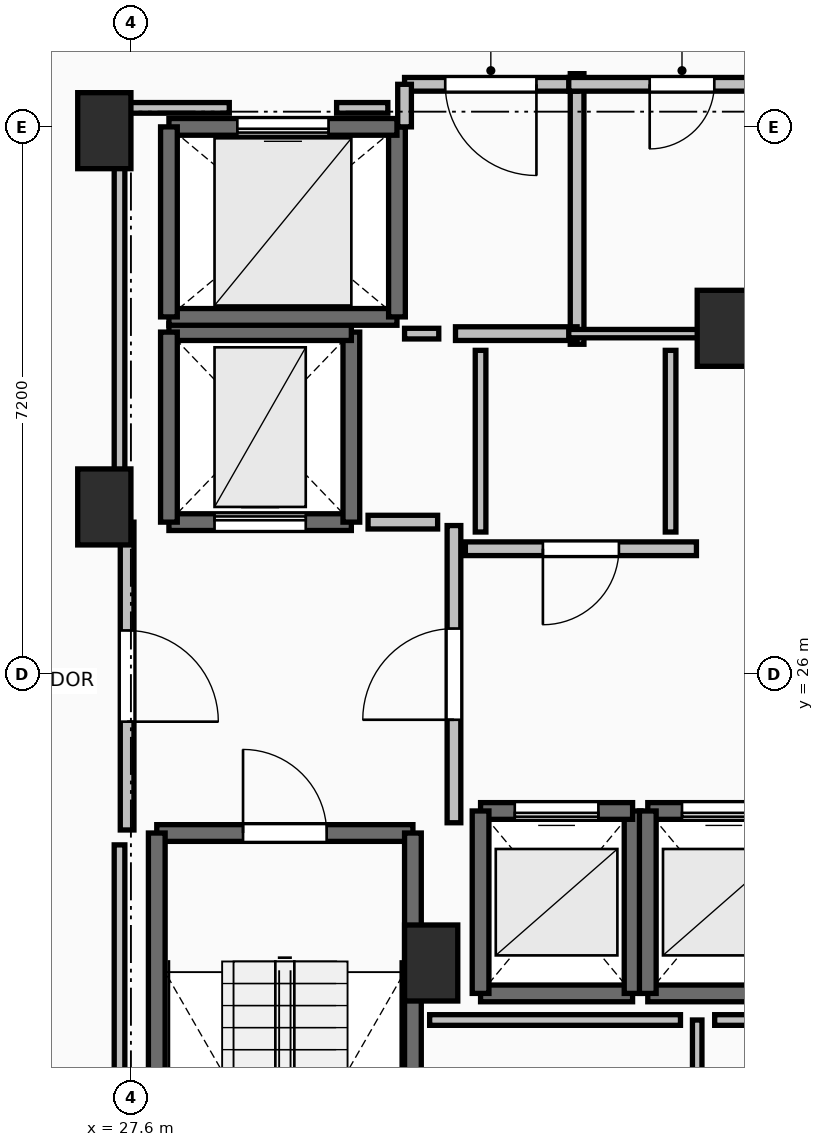
"""IFC4 building model, lengths in metres.
Left out: names, types, materials, properties, quantities, classifications, styles, units other than length and angle.
Written with IfcOpenShell. Run it as: python <this file> out.ifc"""

import sys

from ifc_helpers import new_model, si_unit, direction, frame, frame_2d, origin, origin_2d, place, context, subcontext, project, spatial, rectangle, extrude, element, fill, save


model = new_model("IFC4")
c1 = context("Model", 3, precision=1e-05, world=origin(), true_north=direction((0.0, 1.0)))
c2 = subcontext(c1, "Body", "Model", "MODEL_VIEW")
j1 = project(units=[si_unit("LENGTHUNIT", "METRE"), si_unit("PLANEANGLEUNIT", "RADIAN")], contexts=[c1])
p1 = place(None, origin())
s1 = spatial("IfcSite", under=j1, at=p1, CompositionType="ELEMENT")
p2 = place(p1, origin())
s2 = spatial("IfcBuilding", under=s1, at=p2, CompositionType="ELEMENT")
p3 = place(p2, frame((0.0, 0.0, 203.65)))
s3 = spatial("IfcBuildingStorey", under=s2, at=p3, CompositionType="ELEMENT", Elevation=203.65)
for number, where, z_axis, x_axis in (
    (1, (27.25, 28.2, 0.0), (0.0, 0.0, 1.0), (1.0, 0.0, 0.0)),
    (2, (27.25, 33.15, 0.0), (0.0, 0.0, 1.0), (1.0, 0.0, 0.0)),
    (3, (31.55, 22.2, 0.0), (0.0, 0.0, 1.0), (1.0, 0.0, 0.0)),
    (4, (35.4, 30.55, 0.0), (0.0, 0.0, 1.0), (1.0, 0.0, 0.0)),
):
    element("IfcColumn", number, at=place(p3, frame(where, z_axis=z_axis, x_axis=x_axis)), inside=s3, PredefinedType="PILASTER", context=c2, shape_type="SweptSolid", body=[
        extrude(rectangle(XDim=0.7, YDim=1.0, at=origin_2d()), origin(), (0.0, 0.0, 1.0), 3.55),
    ])
p4 = place(p3, frame((27.94, 23.91, 0.0), z_axis=(0.0, 0.0, 1.0), x_axis=(1.0, 0.0, 0.0)))
e5 = element("IfcWall", 5, at=p4, inside=s3, PredefinedType="SOLIDWALL", context=c2, shape_type="SweptSolid", body=[
    extrude(rectangle(XDim=3.37, YDim=0.22, at=frame_2d((1.685, 0.0))), origin(), (0.0, 0.0, 1.0), 3.29),
])
p5 = place(p4, frame((1.135, 0.0, 0.0)))
e6 = element("IfcOpeningElement", 6, at=p5, cuts=e5, PredefinedType="OPENING", context=c2, shape_type="SweptSolid", body=[
    extrude(rectangle(XDim=1.1, YDim=2.15, at=frame_2d((0.55, 1.075))), frame((0.0, 0.125, 0.0), z_axis=(0.0, -1.0, 0.0), x_axis=(1.0, 0.0, 0.0)), (0.0, 0.0, 1.0), 0.25),
])
for number, where, z_axis, x_axis in (
    (7, (31.31, 23.91, 0.0), (0.0, 0.0, 1.0), (0.0, -1.0, 0.0)),
    (8, (27.94, 16.49, 0.0), (0.0, 0.0, 1.0), (0.0, 1.0, 0.0)),
):
    element("IfcWall", number, at=place(p3, frame(where, z_axis=z_axis, x_axis=x_axis)), inside=s3, PredefinedType="SOLIDWALL", context=c2, shape_type="SweptSolid", body=[
        extrude(rectangle(XDim=7.42, YDim=0.22, at=frame_2d((3.71, 0.0))), origin(), (0.0, 0.0, 1.0), 3.29),
    ])
p6 = place(p3, frame((32.2, 21.8, 0.0), z_axis=(0.0, 0.0, 1.0), x_axis=(1.0, 0.0, 0.0)))
e9 = element("IfcWall", 9, at=p6, inside=s3, PredefinedType="SOLIDWALL", context=c2, shape_type="SweptSolid", body=[
    extrude(rectangle(XDim=2.0, YDim=0.22, at=frame_2d((1.0, 0.0))), origin(), (0.0, 0.0, 1.0), 3.29),
])
p7 = place(p3, frame((34.2, 21.8, 0.0), z_axis=(0.0, 0.0, 1.0), x_axis=(0.0, 1.0, 0.0)))
e10 = element("IfcWall", 10, at=p7, inside=s3, PredefinedType="SOLIDWALL", context=c2, shape_type="SweptSolid", body=[
    extrude(rectangle(XDim=2.4, YDim=0.22, at=frame_2d((1.2, 0.0))), origin(), (0.0, 0.0, 1.0), 3.29),
])
p8 = place(p3, frame((34.2, 24.2, 0.0), z_axis=(0.0, 0.0, 1.0), x_axis=(-1.0, 0.0, 0.0)))
e11 = element("IfcWall", 11, at=p8, inside=s3, PredefinedType="SOLIDWALL", context=c2, shape_type="SweptSolid", body=[
    extrude(rectangle(XDim=2.0, YDim=0.22, at=frame_2d((1.0, 0.0))), origin(), (0.0, 0.0, 1.0), 3.29),
])
p9 = place(p8, frame((0.45, 0.0, 0.0)))
e12 = element("IfcOpeningElement", 12, at=p9, cuts=e11, PredefinedType="OPENING", context=c2, shape_type="SweptSolid", body=[
    extrude(rectangle(XDim=1.1, YDim=2.2, at=frame_2d((0.55, 1.1))), frame((0.0, 0.125, 0.0), z_axis=(0.0, -1.0, 0.0), x_axis=(1.0, 0.0, 0.0)), (0.0, 0.0, 1.0), 0.25),
])
p10 = place(p3, frame((32.2, 24.2, 0.0), z_axis=(0.0, 0.0, 1.0), x_axis=(0.0, -1.0, 0.0)))
e13 = element("IfcWall", 13, at=p10, inside=s3, PredefinedType="SOLIDWALL", context=c2, shape_type="SweptSolid", body=[
    extrude(rectangle(XDim=2.4, YDim=0.22, at=frame_2d((1.2, 0.0))), origin(), (0.0, 0.0, 1.0), 3.29),
])
p11 = place(p3, frame((34.4, 21.8, 0.0), z_axis=(0.0, 0.0, 1.0), x_axis=(1.0, 0.0, 0.0)))
e14 = element("IfcWall", 14, at=p11, inside=s3, PredefinedType="SOLIDWALL", context=c2, shape_type="SweptSolid", body=[
    extrude(rectangle(XDim=2.0, YDim=0.22, at=frame_2d((1.0, 0.0))), origin(), (0.0, 0.0, 1.0), 3.29),
])
p12 = place(p3, frame((36.4, 24.2, 0.0), z_axis=(0.0, 0.0, 1.0), x_axis=(-1.0, 0.0, 0.0)))
e15 = element("IfcWall", 15, at=p12, inside=s3, PredefinedType="SOLIDWALL", context=c2, shape_type="SweptSolid", body=[
    extrude(rectangle(XDim=2.0, YDim=0.22, at=frame_2d((1.0, 0.0))), origin(), (0.0, 0.0, 1.0), 3.29),
])
p13 = place(p12, frame((0.45, 0.0, 0.0)))
e16 = element("IfcOpeningElement", 16, at=p13, cuts=e15, PredefinedType="OPENING", context=c2, shape_type="SweptSolid", body=[
    extrude(rectangle(XDim=1.1, YDim=2.2, at=frame_2d((0.55, 1.1))), frame((0.0, 0.125, 0.0), z_axis=(0.0, -1.0, 0.0), x_axis=(1.0, 0.0, 0.0)), (0.0, 0.0, 1.0), 0.25),
])
p14 = place(p3, frame((34.4, 24.2, 0.0), z_axis=(0.0, 0.0, 1.0), x_axis=(0.0, -1.0, 0.0)))
e17 = element("IfcWall", 17, at=p14, inside=s3, PredefinedType="SOLIDWALL", context=c2, shape_type="SweptSolid", body=[
    extrude(rectangle(XDim=2.4, YDim=0.22, at=frame_2d((1.2, 0.0))), origin(), (0.0, 0.0, 1.0), 3.29),
])
p15 = place(p3, frame((28.1, 28.0, 0.0), z_axis=(0.0, 0.0, 1.0), x_axis=(1.0, 0.0, 0.0)))
e18 = element("IfcWall", 18, at=p15, inside=s3, PredefinedType="SHEAR", context=c2, shape_type="SweptSolid", body=[
    extrude(rectangle(XDim=2.4, YDim=0.22, at=frame_2d((1.2, 0.0))), origin(), (0.0, 0.0, 1.0), 3.29),
])
p16 = place(p15, frame((0.6, 0.0, 0.0)))
e19 = element("IfcOpeningElement", 19, at=p16, cuts=e18, PredefinedType="OPENING", context=c2, shape_type="SweptSolid", body=[
    extrude(rectangle(XDim=1.2, YDim=2.2, at=frame_2d((0.6, 1.1))), frame((0.0, 0.125, 0.0), z_axis=(0.0, -1.0, 0.0), x_axis=(1.0, 0.0, 0.0)), (0.0, 0.0, 1.0), 0.25),
])
p17 = place(p3, frame((30.5, 28.0, 0.0), z_axis=(0.0, 0.0, 1.0), x_axis=(0.0, 1.0, 0.0)))
e20 = element("IfcWall", 20, at=p17, inside=s3, PredefinedType="SHEAR", context=c2, shape_type="SweptSolid", body=[
    extrude(rectangle(XDim=2.5, YDim=0.22, at=frame_2d((1.25, 0.0))), origin(), (0.0, 0.0, 1.0), 3.29),
])
p18 = place(p3, frame((30.5, 30.5, 0.0), z_axis=(0.0, 0.0, 1.0), x_axis=(-1.0, 0.0, 0.0)))
e21 = element("IfcWall", 21, at=p18, inside=s3, PredefinedType="SHEAR", context=c2, shape_type="SweptSolid", body=[
    extrude(rectangle(XDim=2.4, YDim=0.22, at=frame_2d((1.2, 0.0))), origin(), (0.0, 0.0, 1.0), 3.29),
])
p19 = place(p3, frame((28.1, 30.5, 0.0), z_axis=(0.0, 0.0, 1.0), x_axis=(0.0, -1.0, 0.0)))
e22 = element("IfcWall", 22, at=p19, inside=s3, PredefinedType="SHEAR", context=c2, shape_type="SweptSolid", body=[
    extrude(rectangle(XDim=2.5, YDim=0.22, at=frame_2d((1.25, 0.0))), origin(), (0.0, 0.0, 1.0), 3.29),
])
p20 = place(p3, frame((28.1, 30.7, 0.0), z_axis=(0.0, 0.0, 1.0), x_axis=(1.0, 0.0, 0.0)))
e23 = element("IfcWall", 23, at=p20, inside=s3, PredefinedType="SOLIDWALL", context=c2, shape_type="SweptSolid", body=[
    extrude(rectangle(XDim=3.0, YDim=0.22, at=frame_2d((1.5, 0.0))), origin(), (0.0, 0.0, 1.0), 3.29),
])
p21 = place(p3, frame((31.1, 30.7, 0.0), z_axis=(0.0, 0.0, 1.0), x_axis=(0.0, 1.0, 0.0)))
e24 = element("IfcWall", 24, at=p21, inside=s3, PredefinedType="SOLIDWALL", context=c2, shape_type="SweptSolid", body=[
    extrude(rectangle(XDim=2.5, YDim=0.22, at=frame_2d((1.25, 0.0))), origin(), (0.0, 0.0, 1.0), 3.29),
])
p22 = place(p3, frame((31.1, 33.2, 0.0), z_axis=(0.0, 0.0, 1.0), x_axis=(-1.0, 0.0, 0.0)))
e25 = element("IfcWall", 25, at=p22, inside=s3, PredefinedType="SOLIDWALL", context=c2, shape_type="SweptSolid", body=[
    extrude(rectangle(XDim=3.0, YDim=0.22, at=frame_2d((1.5, 0.0))), origin(), (0.0, 0.0, 1.0), 3.29),
])
p23 = place(p22, frame((0.9, 0.0, 0.0)))
e26 = element("IfcOpeningElement", 26, at=p23, cuts=e25, PredefinedType="OPENING", context=c2, shape_type="SweptSolid", body=[
    extrude(rectangle(XDim=1.2, YDim=2.2, at=frame_2d((0.6, 1.1))), frame((0.0, 0.125, 0.0), z_axis=(0.0, -1.0, 0.0), x_axis=(1.0, 0.0, 0.0)), (0.0, 0.0, 1.0), 0.25),
])
p24 = place(p3, frame((28.1, 33.2, 0.0), z_axis=(0.0, 0.0, 1.0), x_axis=(0.0, -1.0, 0.0)))
e27 = element("IfcWall", 27, at=p24, inside=s3, PredefinedType="SOLIDWALL", context=c2, shape_type="SweptSolid", body=[
    extrude(rectangle(XDim=2.5, YDim=0.22, at=frame_2d((1.25, 0.0))), origin(), (0.0, 0.0, 1.0), 3.29),
])
p25 = place(p3, frame((31.85, 24.045, 0.0), z_axis=(0.0, 0.0, 1.0), x_axis=(0.0, 1.0, 0.0)))
e28 = element("IfcWall", 28, at=p25, inside=s3, PredefinedType="PARTITIONING", context=c2, shape_type="SweptSolid", body=[
    extrude(rectangle(XDim=3.91, YDim=0.18, at=frame_2d((1.955, 0.0))), origin(), (0.0, 0.0, 1.0), 3.29),
])
p26 = place(p25, frame((1.355, 0.0, 0.0)))
e29 = element("IfcOpeningElement", 29, at=p26, cuts=e28, PredefinedType="OPENING", context=c2, shape_type="SweptSolid", body=[
    extrude(rectangle(XDim=1.2, YDim=2.15, at=frame_2d((0.6, 1.075))), frame((0.0, 0.105, 0.0), z_axis=(0.0, -1.0, 0.0), x_axis=(1.0, 0.0, 0.0)), (0.0, 0.0, 1.0), 0.21),
])
p27 = place(p3, frame((27.55, 28.0, 0.0), z_axis=(0.0, 0.0, 1.0), x_axis=(0.0, -1.0, 0.0)))
e30 = element("IfcWall", 30, at=p27, inside=s3, PredefinedType="PARTITIONING", context=c2, shape_type="SweptSolid", body=[
    extrude(rectangle(XDim=4.05, YDim=0.18, at=frame_2d((2.025, 0.0))), origin(), (0.0, 0.0, 1.0), 3.29),
])
p28 = place(p27, frame((1.425, 0.0, 0.0)))
e31 = element("IfcOpeningElement", 31, at=p28, cuts=e30, PredefinedType="OPENING", context=c2, shape_type="SweptSolid", body=[
    extrude(rectangle(XDim=1.2, YDim=2.15, at=frame_2d((0.6, 1.075))), frame((0.0, 0.105, 0.0), z_axis=(0.0, -1.0, 0.0), x_axis=(1.0, 0.0, 0.0)), (0.0, 0.0, 1.0), 0.21),
])
p29 = place(p3, frame((33.47, 30.34, 0.0), z_axis=(0.0, 0.0, 1.0), x_axis=(0.0, 1.0, 0.0)))
e32 = element("IfcWall", 32, at=p29, inside=s3, PredefinedType="PARTITIONING", context=c2, shape_type="SweptSolid", body=[
    extrude(rectangle(XDim=3.56, YDim=0.18, at=frame_2d((1.78, 0.0))), origin(), (0.0, 0.0, 1.0), 3.29),
])
p30 = place(p3, frame((31.87, 30.48, 0.0), z_axis=(0.0, 0.0, 1.0), x_axis=(1.0, 0.0, 0.0)))
e33 = element("IfcWall", 33, at=p30, inside=s3, PredefinedType="PARTITIONING", context=c2, shape_type="SweptSolid", body=[
    extrude(rectangle(XDim=1.6, YDim=0.18, at=frame_2d((0.8, 0.0))), origin(), (0.0, 0.0, 1.0), 3.29),
])
p31 = place(p3, frame((33.47, 33.76, 0.0), z_axis=(0.0, 0.0, 1.0), x_axis=(-1.0, 0.0, 0.0)))
e34 = element("IfcWall", 34, at=p31, inside=s3, PredefinedType="PARTITIONING", context=c2, shape_type="SweptSolid", body=[
    extrude(rectangle(XDim=2.27, YDim=0.18, at=frame_2d((1.135, 0.0))), origin(), (0.0, 0.0, 1.0), 3.29),
])
p32 = place(p31, frame((0.535, 0.0, 0.0)))
e35 = element("IfcOpeningElement", 35, at=p32, cuts=e34, PredefinedType="OPENING", context=c2, shape_type="SweptSolid", body=[
    extrude(rectangle(XDim=1.2, YDim=2.15, at=frame_2d((0.6, 1.075))), frame((0.0, 0.105, 0.0), z_axis=(0.0, -1.0, 0.0), x_axis=(1.0, 0.0, 0.0)), (0.0, 0.0, 1.0), 0.21),
])
p33 = place(p3, frame((31.2, 33.76, 0.0), z_axis=(0.0, 0.0, 1.0), x_axis=(0.0, -1.0, 0.0)))
e36 = element("IfcWall", 36, at=p33, inside=s3, PredefinedType="PARTITIONING", context=c2, shape_type="SweptSolid", body=[
    extrude(rectangle(XDim=0.56, YDim=0.18, at=frame_2d((0.28, 0.0))), origin(), (0.0, 0.0, 1.0), 3.29),
])
p34 = place(p3, frame((35.04, 27.65, 0.0), z_axis=(0.0, 0.0, 1.0), x_axis=(-1.0, 0.0, 0.0)))
e37 = element("IfcWall", 37, at=p34, inside=s3, PredefinedType="PARTITIONING", context=c2, shape_type="SweptSolid", body=[
    extrude(rectangle(XDim=3.04, YDim=0.18, at=frame_2d((1.52, 0.0))), origin(), (0.0, 0.0, 1.0), 3.29),
])
p35 = place(p34, frame((1.02, 0.0, 0.0)))
e38 = element("IfcOpeningElement", 38, at=p35, cuts=e37, PredefinedType="OPENING", context=c2, shape_type="SweptSolid", body=[
    extrude(rectangle(XDim=1.0, YDim=2.15, at=frame_2d((0.5, 1.075))), frame((0.0, 0.105, 0.0), z_axis=(0.0, -1.0, 0.0), x_axis=(1.0, 0.0, 0.0)), (0.0, 0.0, 1.0), 0.21),
])
p36 = place(p3, frame((33.36, 30.48, 0.0), z_axis=(0.0, 0.0, 1.0), x_axis=(1.0, 0.0, 0.0)))
e39 = element("IfcWall", 39, at=p36, inside=s3, PredefinedType="PARTITIONING", context=c2, shape_type="SweptSolid", body=[
    extrude(rectangle(XDim=1.81, YDim=0.11, at=frame_2d((0.905, 0.0))), origin(), (0.0, 0.0, 1.0), 3.29),
])
p37 = place(p3, frame((36.34, 33.76, 0.0), z_axis=(0.0, 0.0, 1.0), x_axis=(-1.0, 0.0, 0.0)))
e40 = element("IfcWall", 40, at=p37, inside=s3, PredefinedType="PARTITIONING", context=c2, shape_type="SweptSolid", body=[
    extrude(rectangle(XDim=2.98, YDim=0.18, at=frame_2d((1.49, 0.0))), origin(), (0.0, 0.0, 1.0), 3.29),
])
p38 = place(p37, frame((1.065, 0.0, 0.0)))
e41 = element("IfcOpeningElement", 41, at=p38, cuts=e40, PredefinedType="OPENING", context=c2, shape_type="SweptSolid", body=[
    extrude(rectangle(XDim=0.85, YDim=2.1, at=frame_2d((0.425, 1.05))), frame((0.0, 0.105, 0.0), z_axis=(0.0, -1.0, 0.0), x_axis=(1.0, 0.0, 0.0)), (0.0, 0.0, 1.0), 0.21),
])
p39 = place(p3, frame((35.05, 16.32, 0.0), z_axis=(0.0, 0.0, 1.0), x_axis=(0.0, 1.0, 0.0)))
e42 = element("IfcWall", 42, at=p39, inside=s3, PredefinedType="PARTITIONING", context=c2, shape_type="SweptSolid", body=[
    extrude(rectangle(XDim=5.13, YDim=0.125, at=frame_2d((2.565, 0.0))), origin(), (0.0, 0.0, 1.0), 3.29),
])
p40 = place(p3, frame((31.635, 28.0, 0.0), z_axis=(0.0, 0.0, 1.0), x_axis=(-1.0, 0.0, 0.0)))
e43 = element("IfcWall", 43, at=p40, inside=s3, PredefinedType="PARTITIONING", context=c2, shape_type="SweptSolid", body=[
    extrude(rectangle(XDim=0.915, YDim=0.18, at=frame_2d((0.458, 0.0))), origin(), (0.0, 0.0, 1.0), 3.29),
])
p41 = place(p3, frame((31.2, 30.48, 0.0), z_axis=(0.0, 0.0, 1.0), x_axis=(1.0, 0.0, 0.0)))
e44 = element("IfcWall", 44, at=p41, inside=s3, PredefinedType="PARTITIONING", context=c2, shape_type="SweptSolid", body=[
    extrude(rectangle(XDim=0.45, YDim=0.14, at=frame_2d((0.225, 0.0))), origin(), (0.0, 0.0, 1.0), 3.29),
])
p42 = place(p3, frame((35.14, 30.48, 0.0), z_axis=(0.0, 0.0, 1.0), x_axis=(1.0, 0.0, 0.0)))
e45 = element("IfcWall", 45, at=p42, inside=s3, PredefinedType="PARTITIONING", context=c2, shape_type="SweptSolid", body=[
    extrude(rectangle(XDim=1.0, YDim=0.14, at=frame_2d((0.5, 0.0))), origin(), (0.0, 0.0, 1.0), 2.482),
])
p43 = place(p3, frame((34.83, 21.45, 0.0), z_axis=(0.0, 0.0, 1.0), x_axis=(-1.0, 0.0, 0.0)))
e46 = element("IfcWall", 46, at=p43, inside=s3, PredefinedType="PARTITIONING", context=c2, shape_type="SweptSolid", body=[
    extrude(rectangle(XDim=3.3, YDim=0.14, at=frame_2d((1.65, 0.0))), origin(), (0.0, 0.0, 1.0), 3.29),
])
p44 = place(p3, frame((36.439, 21.45, 0.0), z_axis=(0.0, 0.0, 1.0), x_axis=(-1.0, 0.0, 0.0)))
e47 = element("IfcWall", 47, at=p44, inside=s3, PredefinedType="PARTITIONING", context=c2, shape_type="SweptSolid", body=[
    extrude(rectangle(XDim=1.159, YDim=0.14, at=frame_2d((0.58, 0.0))), origin(), (0.0, 0.0, 1.0), 3.29),
])
for number, where, z_axis, x_axis in (
    (48, (32.2, 30.26, 0.0), (0.0, 0.0, 1.0), (0.0, -1.0, 0.0)),
    (49, (34.7, 27.87, 0.0), (0.0, 0.0, 1.0), (0.0, 1.0, 0.0)),
):
    element("IfcWall", number, at=place(p3, frame(where, z_axis=z_axis, x_axis=x_axis)), inside=s3, PredefinedType="PARTITIONING", context=c2, shape_type="SweptSolid", body=[
        extrude(rectangle(XDim=2.39, YDim=0.14, at=frame_2d((1.195, 0.0))), origin(), (0.0, 0.0, 1.0), 3.29),
    ])
p45 = place(p3, frame((30.98, 33.45, 0.0), z_axis=(0.0, 0.0, 1.0), x_axis=(-1.0, 0.0, 0.0)))
e50 = element("IfcWall", 50, at=p45, inside=s3, PredefinedType="PARTITIONING", context=c2, shape_type="SweptSolid", body=[
    extrude(rectangle(XDim=0.674, YDim=0.14, at=frame_2d((0.337, 0.0))), origin(), (0.0, 0.0, 1.0), 3.29),
])
p46 = place(p3, frame((28.894, 33.45, 0.0), z_axis=(0.0, 0.0, 1.0), x_axis=(-1.0, 0.0, 0.0)))
e51 = element("IfcWall", 51, at=p46, inside=s3, PredefinedType="PARTITIONING", context=c2, shape_type="SweptSolid", body=[
    extrude(rectangle(XDim=1.444, YDim=0.14, at=frame_2d((0.722, 0.0))), origin(), (0.0, 0.0, 1.0), 2.482),
])
p47 = place(p3, frame((27.45, 33.45, 0.0), z_axis=(0.0, 0.0, 1.0), x_axis=(0.0, -1.0, 0.0)))
e52 = element("IfcWall", 52, at=p47, inside=s3, PredefinedType="PARTITIONING", context=c2, shape_type="SweptSolid", body=[
    extrude(rectangle(XDim=5.254, YDim=0.14, at=frame_2d((2.627, 0.0))), origin(), (0.0, 0.0, 1.0), 2.482),
])
p48 = place(p3, frame((27.45, 23.754, 0.0), z_axis=(0.0, 0.0, 1.0), x_axis=(0.0, -1.0, 0.0)))
e53 = element("IfcWall", 53, at=p48, inside=s3, PredefinedType="PARTITIONING", context=c2, shape_type="SweptSolid", body=[
    extrude(rectangle(XDim=7.514, YDim=0.14, at=frame_2d((3.757, 0.0))), origin(), (0.0, 0.0, 1.0), 2.482),
])
p49 = place(p5, origin())
e54 = element("IfcDoor", 54, at=p49, inside=s3, OperationType="SINGLE_SWING_LEFT", PredefinedType="DOOR", context=c2, shape_type="SweptSolid", body=[
    extrude(rectangle(XDim=1.1, YDim=2.15, at=frame_2d((0.55, 1.075))), frame((0.0, 0.025, 0.0), z_axis=(0.0, -1.0, 0.0), x_axis=(1.0, 0.0, 0.0)), (0.0, 0.0, 1.0), 0.05),
])
fill(e6, e54)
p50 = place(p9, origin())
e55 = element("IfcDoor", 55, at=p50, inside=s3, OperationType="SLIDING_TO_LEFT", PredefinedType="DOOR", context=c2, shape_type="SweptSolid", body=[
    extrude(rectangle(XDim=1.1, YDim=2.2, at=frame_2d((0.55, 1.1))), frame((0.0, 0.025, 0.0), z_axis=(0.0, -1.0, 0.0), x_axis=(1.0, 0.0, 0.0)), (0.0, 0.0, 1.0), 0.05),
])
fill(e12, e55)
p51 = place(p13, origin())
e56 = element("IfcDoor", 56, at=p51, inside=s3, OperationType="SLIDING_TO_LEFT", PredefinedType="DOOR", context=c2, shape_type="SweptSolid", body=[
    extrude(rectangle(XDim=1.1, YDim=2.2, at=frame_2d((0.55, 1.1))), frame((0.0, 0.025, 0.0), z_axis=(0.0, -1.0, 0.0), x_axis=(1.0, 0.0, 0.0)), (0.0, 0.0, 1.0), 0.05),
])
fill(e16, e56)
p52 = place(p16, origin())
e57 = element("IfcDoor", 57, at=p52, inside=s3, OperationType="SLIDING_TO_LEFT", PredefinedType="DOOR", context=c2, shape_type="SweptSolid", body=[
    extrude(rectangle(XDim=1.2, YDim=2.2, at=frame_2d((0.6, 1.1))), frame((0.0, 0.025, 0.0), z_axis=(0.0, -1.0, 0.0), x_axis=(1.0, 0.0, 0.0)), (0.0, 0.0, 1.0), 0.05),
])
fill(e19, e57)
p53 = place(p23, origin())
e58 = element("IfcDoor", 58, at=p53, inside=s3, OperationType="SLIDING_TO_LEFT", PredefinedType="DOOR", context=c2, shape_type="SweptSolid", body=[
    extrude(rectangle(XDim=1.2, YDim=2.2, at=frame_2d((0.6, 1.1))), frame((0.0, 0.025, 0.0), z_axis=(0.0, -1.0, 0.0), x_axis=(1.0, 0.0, 0.0)), (0.0, 0.0, 1.0), 0.05),
])
fill(e26, e58)
p54 = place(p26, origin())
e59 = element("IfcDoor", 59, at=p54, inside=s3, OperationType="SINGLE_SWING_LEFT", PredefinedType="DOOR", context=c2, shape_type="SweptSolid", body=[
    extrude(rectangle(XDim=1.2, YDim=2.15, at=frame_2d((0.6, 1.075))), frame((0.0, 0.025, 0.0), z_axis=(0.0, -1.0, 0.0), x_axis=(1.0, 0.0, 0.0)), (0.0, 0.0, 1.0), 0.05),
])
fill(e29, e59)
p55 = place(p28, origin())
e60 = element("IfcDoor", 60, at=p55, inside=s3, OperationType="SINGLE_SWING_RIGHT", PredefinedType="DOOR", context=c2, shape_type="SweptSolid", body=[
    extrude(rectangle(XDim=1.2, YDim=2.15, at=frame_2d((0.6, 1.075))), frame((0.0, 0.025, 0.0), z_axis=(0.0, -1.0, 0.0), x_axis=(1.0, 0.0, 0.0)), (0.0, 0.0, 1.0), 0.05),
])
fill(e31, e60)
p56 = place(p32, origin())
e61 = element("IfcDoor", 61, at=p56, inside=s3, OperationType="SINGLE_SWING_LEFT", PredefinedType="DOOR", context=c2, shape_type="SweptSolid", body=[
    extrude(rectangle(XDim=1.2, YDim=2.15, at=frame_2d((0.6, 1.075))), frame((0.0, 0.025, 0.0), z_axis=(0.0, -1.0, 0.0), x_axis=(1.0, 0.0, 0.0)), (0.0, 0.0, 1.0), 0.05),
])
fill(e35, e61)
p57 = place(p35, origin())
e62 = element("IfcDoor", 62, at=p57, inside=s3, OperationType="SINGLE_SWING_RIGHT", PredefinedType="DOOR", context=c2, shape_type="SweptSolid", body=[
    extrude(rectangle(XDim=1.0, YDim=2.15, at=frame_2d((0.5, 1.075))), frame((0.0, 0.025, 0.0), z_axis=(0.0, -1.0, 0.0), x_axis=(1.0, 0.0, 0.0)), (0.0, 0.0, 1.0), 0.05),
])
fill(e38, e62)
p58 = place(p38, origin())
e63 = element("IfcDoor", 63, at=p58, inside=s3, OperationType="SINGLE_SWING_RIGHT", PredefinedType="DOOR", context=c2, shape_type="SweptSolid", body=[
    extrude(rectangle(XDim=0.85, YDim=2.1, at=frame_2d((0.425, 1.05))), frame((0.0, 0.025, 0.0), z_axis=(0.0, -1.0, 0.0), x_axis=(1.0, 0.0, 0.0)), (0.0, 0.0, 1.0), 0.05),
])
fill(e41, e63)
save(model, sys.argv[1])
